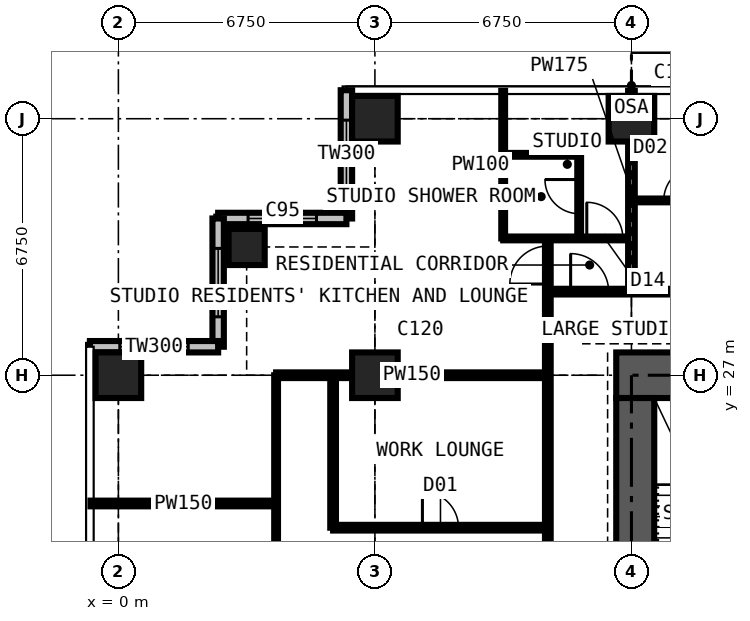
"""IFC4 building model, lengths in metres.
Left out: names, types, materials, properties, quantities, classifications, styles, units other than length and angle.
Written with IfcOpenShell. Run it as: python <this file> out.ifc"""

import sys

from ifc_helpers import new_model, si_unit, direction, frame, frame_2d, origin, origin_2d, place, context, subcontext, project, spatial, rectangle, extrude, element, fill, save


model = new_model("IFC4")
c1 = context("Model", 3, precision=1e-05, world=origin(), true_north=direction((0.0, 1.0)))
c2 = subcontext(c1, "Body", "Model", "MODEL_VIEW")
j1 = project(units=[si_unit("LENGTHUNIT", "METRE"), si_unit("PLANEANGLEUNIT", "RADIAN")], contexts=[c1])
p1 = place(None, origin())
s1 = spatial("IfcSite", under=j1, at=p1, CompositionType="ELEMENT")
p2 = place(p1, origin())
s2 = spatial("IfcBuilding", under=s1, at=p2, CompositionType="ELEMENT")
p3 = place(p2, frame((0.0, 0.0, 174.6)))
s3 = spatial("IfcBuildingStorey", under=s2, at=p3, CompositionType="ELEMENT", Elevation=174.6)
p4 = place(p3, frame((0.0, 27.0, 0.0), z_axis=(0.0, 0.0, 1.0), x_axis=(1.0, 0.0, 0.0)))
e1 = element("IfcColumn", 1, at=p4, inside=s3, PredefinedType="COLUMN", context=c2, shape_type="SweptSolid", body=[
    extrude(rectangle(XDim=1.2, YDim=1.2, at=origin_2d()), origin(), (0.0, 0.0, 1.0), 3.6),
])
p5 = place(p3, frame((3.375, 30.375, 0.0), z_axis=(0.0, 0.0, 1.0), x_axis=(1.0, 0.0, 0.0)))
e2 = element("IfcColumn", 2, at=p5, inside=s3, PredefinedType="COLUMN", context=c2, shape_type="SweptSolid", body=[
    extrude(rectangle(XDim=0.95, YDim=0.95, at=origin_2d()), origin(), (0.0, 0.0, 1.0), 3.6),
])
for number, where, z_axis, x_axis in (
    (3, (6.75, 27.0, 0.0), (0.0, 0.0, 1.0), (1.0, 0.0, 0.0)),
    (4, (6.75, 33.75, 0.0), (0.0, 0.0, 1.0), (1.0, 0.0, 0.0)),
    (5, (13.5, 33.75, 0.0), (0.0, 0.0, 1.0), (1.0, 0.0, 0.0)),
):
    element("IfcColumn", number, at=place(p3, frame(where, z_axis=z_axis, x_axis=x_axis)), inside=s3, PredefinedType="COLUMN", context=c2, shape_type="SweptSolid", body=[
        extrude(rectangle(XDim=1.2, YDim=1.2, at=origin_2d()), origin(), (0.0, 0.0, 1.0), 3.6),
    ])
p6 = place(p3, frame((27.4, 27.0, 0.0), z_axis=(0.0, 0.0, 1.0), x_axis=(-1.0, 0.0, 0.0)))
e6 = element("IfcWall", 6, at=p6, inside=s3, PredefinedType="SHEAR", context=c2, shape_type="SweptSolid", body=[
    extrude(rectangle(XDim=14.3, YDim=1.2, at=frame_2d((7.15, 0.0))), origin(), (0.0, 0.0, 1.0), 3.6),
])
p7 = place(p6, frame((5.225, 0.0, 0.0)))
e7 = element("IfcOpeningElement", 7, at=p7, cuts=e6, PredefinedType="OPENING", context=c2, shape_type="SweptSolid", body=[
    extrude(rectangle(XDim=0.9, YDim=2.2, at=frame_2d((0.45, 1.1))), frame((0.0, 0.61, 0.0), z_axis=(0.0, -1.0, 0.0), x_axis=(1.0, 0.0, 0.0)), (0.0, 0.0, 1.0), 1.22),
])
p8 = place(p6, frame((8.2, 0.0, 0.0)))
e8 = element("IfcOpeningElement", 8, at=p8, cuts=e6, PredefinedType="OPENING", context=c2, shape_type="SweptSolid", body=[
    extrude(rectangle(XDim=1.0, YDim=2.2, at=frame_2d((0.5, 1.1))), frame((0.0, 0.61, 0.0), z_axis=(0.0, -1.0, 0.0), x_axis=(1.0, 0.0, 0.0)), (0.0, 0.0, 1.0), 1.22),
])
p9 = place(p3, frame((13.6, 26.4, 0.0), z_axis=(0.0, 0.0, 1.0), x_axis=(0.0, -1.0, 0.0)))
e9 = element("IfcWall", 9, at=p9, inside=s3, PredefinedType="SHEAR", context=c2, shape_type="SweptSolid", body=[
    extrude(rectangle(XDim=12.3, YDim=1.0, at=frame_2d((6.15, 0.0))), origin(), (0.0, 0.0, 1.0), 3.6),
])
p10 = place(p9, frame((7.45, 0.0, 0.0)))
e10 = element("IfcOpeningElement", 10, at=p10, cuts=e9, PredefinedType="OPENING", context=c2, shape_type="SweptSolid", body=[
    extrude(rectangle(XDim=1.2, YDim=2.2, at=frame_2d((0.6, 1.1))), frame((0.0, 0.51, 0.0), z_axis=(0.0, -1.0, 0.0), x_axis=(1.0, 0.0, 0.0)), (0.0, 0.0, 1.0), 1.02),
])
p11 = place(p3, frame((6.0, 34.5, 0.0), z_axis=(0.0, 0.0, 1.0), x_axis=(0.0, -1.0, 0.0)))
e11 = element("IfcWall", 11, at=p11, inside=s3, PredefinedType="SOLIDWALL", context=c2, shape_type="SweptSolid", body=[
    extrude(rectangle(XDim=3.375, YDim=0.3, at=frame_2d((1.688, 0.0))), origin(), (0.0, 0.0, 1.0), 3.375),
])
p12 = place(p11, frame((0.788, 0.0, 0.6)))
e12 = element("IfcOpeningElement", 12, at=p12, cuts=e11, PredefinedType="OPENING", context=c2, shape_type="SweptSolid", body=[
    extrude(rectangle(XDim=1.8, YDim=2.1, at=frame_2d((0.9, 1.05))), frame((0.0, 0.16, 0.0), z_axis=(0.0, -1.0, 0.0), x_axis=(1.0, 0.0, 0.0)), (0.0, 0.0, 1.0), 0.32),
])
p13 = place(p3, frame((6.0, 31.125, 0.0), z_axis=(0.0, 0.0, 1.0), x_axis=(-1.0, 0.0, 0.0)))
e13 = element("IfcWall", 13, at=p13, inside=s3, PredefinedType="SOLIDWALL", context=c2, shape_type="SweptSolid", body=[
    extrude(rectangle(XDim=3.375, YDim=0.3, at=frame_2d((1.688, 0.0))), origin(), (0.0, 0.0, 1.0), 3.375),
])
p14 = place(p13, frame((0.788, 0.0, 0.6)))
e14 = element("IfcOpeningElement", 14, at=p14, cuts=e13, PredefinedType="OPENING", context=c2, shape_type="SweptSolid", body=[
    extrude(rectangle(XDim=1.8, YDim=2.1, at=frame_2d((0.9, 1.05))), frame((0.0, 0.16, 0.0), z_axis=(0.0, -1.0, 0.0), x_axis=(1.0, 0.0, 0.0)), (0.0, 0.0, 1.0), 0.32),
])
p15 = place(p3, frame((2.625, 31.125, 0.0), z_axis=(0.0, 0.0, 1.0), x_axis=(0.0, -1.0, 0.0)))
e15 = element("IfcWall", 15, at=p15, inside=s3, PredefinedType="SOLIDWALL", context=c2, shape_type="SweptSolid", body=[
    extrude(rectangle(XDim=3.375, YDim=0.3, at=frame_2d((1.688, 0.0))), origin(), (0.0, 0.0, 1.0), 3.375),
])
p16 = place(p15, frame((0.788, 0.0, 0.6)))
e16 = element("IfcOpeningElement", 16, at=p16, cuts=e15, PredefinedType="OPENING", context=c2, shape_type="SweptSolid", body=[
    extrude(rectangle(XDim=1.8, YDim=2.1, at=frame_2d((0.9, 1.05))), frame((0.0, 0.16, 0.0), z_axis=(0.0, -1.0, 0.0), x_axis=(1.0, 0.0, 0.0)), (0.0, 0.0, 1.0), 0.32),
])
p17 = place(p3, frame((2.625, 27.75, 0.0), z_axis=(0.0, 0.0, 1.0), x_axis=(-1.0, 0.0, 0.0)))
e17 = element("IfcWall", 17, at=p17, inside=s3, PredefinedType="SOLIDWALL", context=c2, shape_type="SweptSolid", body=[
    extrude(rectangle(XDim=3.375, YDim=0.3, at=frame_2d((1.688, 0.0))), origin(), (0.0, 0.0, 1.0), 3.375),
])
p18 = place(p17, frame((0.788, 0.0, 0.6)))
e18 = element("IfcOpeningElement", 18, at=p18, cuts=e17, PredefinedType="OPENING", context=c2, shape_type="SweptSolid", body=[
    extrude(rectangle(XDim=1.8, YDim=2.1, at=frame_2d((0.9, 1.05))), frame((0.0, 0.16, 0.0), z_axis=(0.0, -1.0, 0.0), x_axis=(1.0, 0.0, 0.0)), (0.0, 0.0, 1.0), 0.32),
])
p19 = place(p3, frame((-0.734, 23.625, 0.0), z_axis=(0.0, 0.0, 1.0), x_axis=(1.0, 0.0, 0.0)))
e19 = element("IfcWall", 19, at=p19, inside=s3, PredefinedType="PARTITIONING", context=c2, shape_type="SweptSolid", body=[
    extrude(rectangle(XDim=4.884, YDim=0.15, at=frame_2d((2.442, 0.0))), origin(), (0.0, 0.0, 1.0), 3.375),
])
p20 = place(p3, frame((4.15, 10.125, 0.0), z_axis=(0.0, 0.0, 1.0), x_axis=(0.0, 1.0, 0.0)))
e20 = element("IfcWall", 20, at=p20, inside=s3, PredefinedType="PARTITIONING", context=c2, shape_type="SweptSolid", body=[
    extrude(rectangle(XDim=16.875, YDim=0.1, at=frame_2d((8.438, 0.0))), origin(), (0.0, 0.0, 1.0), 3.375),
])
p21 = place(p20, frame((4.2, 0.0, 0.0)))
e21 = element("IfcOpeningElement", 21, at=p21, cuts=e20, PredefinedType="OPENING", context=c2, shape_type="SweptSolid", body=[
    extrude(rectangle(XDim=0.95, YDim=2.2, at=frame_2d((0.475, 1.1))), frame((0.0, 0.06, 0.0), z_axis=(0.0, -1.0, 0.0), x_axis=(1.0, 0.0, 0.0)), (0.0, 0.0, 1.0), 0.12),
])
p22 = place(p20, frame((10.95, 0.0, 0.0)))
e22 = element("IfcOpeningElement", 22, at=p22, cuts=e20, PredefinedType="OPENING", context=c2, shape_type="SweptSolid", body=[
    extrude(rectangle(XDim=0.95, YDim=2.2, at=frame_2d((0.475, 1.1))), frame((0.0, 0.06, 0.0), z_axis=(0.0, -1.0, 0.0), x_axis=(1.0, 0.0, 0.0)), (0.0, 0.0, 1.0), 0.12),
])
p23 = place(p3, frame((4.15, 27.0, 0.0), z_axis=(0.0, 0.0, 1.0), x_axis=(1.0, 0.0, 0.0)))
e23 = element("IfcWall", 23, at=p23, inside=s3, PredefinedType="PARTITIONING", context=c2, shape_type="SweptSolid", body=[
    extrude(rectangle(XDim=7.15, YDim=0.15, at=frame_2d((3.575, 0.0))), origin(), (0.0, 0.0, 1.0), 2.806),
])
p24 = place(p3, frame((5.65, 22.988, 0.0), z_axis=(0.0, 0.0, 1.0), x_axis=(0.0, 1.0, 0.0)))
e24 = element("IfcWall", 24, at=p24, inside=s3, PredefinedType="PARTITIONING", context=c2, shape_type="SweptSolid", body=[
    extrude(rectangle(XDim=4.012, YDim=0.15, at=frame_2d((2.006, 0.0))), origin(), (0.0, 0.0, 1.0), 3.375),
])
p25 = place(p3, frame((5.65, 22.988, 0.0), z_axis=(0.0, 0.0, 1.0), x_axis=(1.0, 0.0, 0.0)))
e25 = element("IfcWall", 25, at=p25, inside=s3, PredefinedType="PARTITIONING", context=c2, shape_type="SweptSolid", body=[
    extrude(rectangle(XDim=5.65, YDim=0.15, at=frame_2d((2.825, 0.0))), origin(), (0.0, 0.0, 1.0), 3.375),
])
p26 = place(p25, frame((2.35, 0.0, 0.0)))
e26 = element("IfcOpeningElement", 26, at=p26, cuts=e25, PredefinedType="OPENING", context=c2, shape_type="SweptSolid", body=[
    extrude(rectangle(XDim=0.95, YDim=2.2, at=frame_2d((0.475, 1.1))), frame((0.0, 0.085, 0.0), z_axis=(0.0, -1.0, 0.0), x_axis=(1.0, 0.0, 0.0)), (0.0, 0.0, 1.0), 0.17),
])
p27 = place(p3, frame((10.125, 30.6, 0.0), z_axis=(0.0, 0.0, 1.0), x_axis=(0.0, 1.0, 0.0)))
e27 = element("IfcWall", 27, at=p27, inside=s3, PredefinedType="PARTITIONING", context=c2, shape_type="SweptSolid", body=[
    extrude(rectangle(XDim=3.884, YDim=0.1, at=frame_2d((1.942, 0.0))), origin(), (0.0, 0.0, 1.0), 3.375),
])
p28 = place(p3, frame((10.125, 30.6, 0.0), z_axis=(0.0, 0.0, 1.0), x_axis=(1.0, 0.0, 0.0)))
e28 = element("IfcWall", 28, at=p28, inside=s3, PredefinedType="PARTITIONING", context=c2, shape_type="SweptSolid", body=[
    extrude(rectangle(XDim=3.375, YDim=0.1, at=frame_2d((1.688, 0.0))), origin(), (0.0, 0.0, 1.0), 3.375),
])
p29 = place(p28, frame((2.2, 0.0, 0.0)))
e29 = element("IfcOpeningElement", 29, at=p29, cuts=e28, PredefinedType="OPENING", context=c2, shape_type="SweptSolid", body=[
    extrude(rectangle(XDim=0.95, YDim=2.2, at=frame_2d((0.475, 1.1))), frame((0.0, 0.06, 0.0), z_axis=(0.0, -1.0, 0.0), x_axis=(1.0, 0.0, 0.0)), (0.0, 0.0, 1.0), 0.12),
])
p30 = place(p3, frame((10.125, 32.8, 0.0), z_axis=(0.0, 0.0, 1.0), x_axis=(1.0, 0.0, 0.0)))
e30 = element("IfcWall", 30, at=p30, inside=s3, PredefinedType="PARTITIONING", context=c2, shape_type="SweptSolid", body=[
    extrude(rectangle(XDim=2.0, YDim=0.1, at=frame_2d((1.0, 0.0))), origin(), (0.0, 0.0, 1.0), 3.375),
])
p31 = place(p3, frame((11.3, 11.3, 0.0), z_axis=(0.0, 0.0, 1.0), x_axis=(0.0, 1.0, 0.0)))
e31 = element("IfcWall", 31, at=p31, inside=s3, PredefinedType="PARTITIONING", context=c2, shape_type="SweptSolid", body=[
    extrude(rectangle(XDim=19.3, YDim=0.15, at=frame_2d((9.65, 0.0))), origin(), (0.0, 0.0, 1.0), 3.375),
])
p32 = place(p31, frame((18.1, 0.0, 0.0)))
e32 = element("IfcOpeningElement", 32, at=p32, cuts=e31, PredefinedType="OPENING", context=c2, shape_type="SweptSolid", body=[
    extrude(rectangle(XDim=1.0, YDim=2.2, at=frame_2d((0.5, 1.1))), frame((0.0, 0.085, 0.0), z_axis=(0.0, -1.0, 0.0), x_axis=(1.0, 0.0, 0.0)), (0.0, 0.0, 1.0), 0.17),
])
p33 = place(p31, frame((10.137, 0.0, 0.0)))
e33 = element("IfcOpeningElement", 33, at=p33, cuts=e31, PredefinedType="OPENING", context=c2, shape_type="SweptSolid", body=[
    extrude(rectangle(XDim=1.0, YDim=2.2, at=frame_2d((0.5, 1.1))), frame((0.0, 0.085, 0.0), z_axis=(0.0, -1.0, 0.0), x_axis=(1.0, 0.0, 0.0)), (0.0, 0.0, 1.0), 0.17),
])
p34 = place(p3, frame((11.3, 29.2, 0.0), z_axis=(0.0, 0.0, 1.0), x_axis=(1.0, 0.0, 0.0)))
e34 = element("IfcWall", 34, at=p34, inside=s3, PredefinedType="PARTITIONING", context=c2, shape_type="SweptSolid", body=[
    extrude(rectangle(XDim=19.809, YDim=0.15, at=frame_2d((9.904, 0.0))), origin(), (0.0, 0.0, 1.0), 3.375),
])
p35 = place(p34, frame((12.9, 0.0, 0.0)))
e35 = element("IfcOpeningElement", 35, at=p35, cuts=e34, PredefinedType="OPENING", context=c2, shape_type="SweptSolid", body=[
    extrude(rectangle(XDim=1.0, YDim=2.2, at=frame_2d((0.5, 1.1))), frame((0.0, 0.085, 0.0), z_axis=(0.0, -1.0, 0.0), x_axis=(1.0, 0.0, 0.0)), (0.0, 0.0, 1.0), 0.17),
])
p36 = place(p34, frame((6.4, 0.0, 0.0)))
e36 = element("IfcOpeningElement", 36, at=p36, cuts=e34, PredefinedType="OPENING", context=c2, shape_type="SweptSolid", body=[
    extrude(rectangle(XDim=0.95, YDim=2.2, at=frame_2d((0.475, 1.1))), frame((0.0, 0.085, 0.0), z_axis=(0.0, -1.0, 0.0), x_axis=(1.0, 0.0, 0.0)), (0.0, 0.0, 1.0), 0.17),
])
p37 = place(p34, frame((0.6, 0.0, 0.0)))
e37 = element("IfcOpeningElement", 37, at=p37, cuts=e34, PredefinedType="OPENING", context=c2, shape_type="SweptSolid", body=[
    extrude(rectangle(XDim=1.0, YDim=2.2, at=frame_2d((0.5, 1.1))), frame((0.0, 0.085, 0.0), z_axis=(0.0, -1.0, 0.0), x_axis=(1.0, 0.0, 0.0)), (0.0, 0.0, 1.0), 0.17),
])
p38 = place(p3, frame((12.125, 30.6, 0.0), z_axis=(0.0, 0.0, 1.0), x_axis=(0.0, 1.0, 0.0)))
e38 = element("IfcWall", 38, at=p38, inside=s3, PredefinedType="PARTITIONING", context=c2, shape_type="SweptSolid", body=[
    extrude(rectangle(XDim=2.2, YDim=0.1, at=frame_2d((1.1, 0.0))), origin(), (0.0, 0.0, 1.0), 3.375),
])
p39 = place(p38, frame((0.65, 0.0, 0.0)))
e39 = element("IfcOpeningElement", 39, at=p39, cuts=e38, PredefinedType="OPENING", context=c2, shape_type="SweptSolid", body=[
    extrude(rectangle(XDim=0.9, YDim=2.2, at=frame_2d((0.45, 1.1))), frame((0.0, 0.06, 0.0), z_axis=(0.0, -1.0, 0.0), x_axis=(1.0, 0.0, 0.0)), (0.0, 0.0, 1.0), 0.12),
])
p40 = place(p3, frame((13.5, 29.2, 0.0), z_axis=(0.0, 0.0, 1.0), x_axis=(0.0, 1.0, 0.0)))
e40 = element("IfcWall", 40, at=p40, inside=s3, PredefinedType="PARTITIONING", context=c2, shape_type="SweptSolid", body=[
    extrude(rectangle(XDim=5.284, YDim=0.175, at=frame_2d((2.642, 0.0))), origin(), (0.0, 0.0, 1.0), 2.61),
])
p41 = place(p3, frame((13.5, 31.6, 0.0), z_axis=(0.0, 0.0, 1.0), x_axis=(1.0, 0.0, 0.0)))
e41 = element("IfcWall", 41, at=p41, inside=s3, PredefinedType="PARTITIONING", context=c2, shape_type="SweptSolid", body=[
    extrude(rectangle(XDim=2.6, YDim=0.1, at=frame_2d((1.3, 0.0))), origin(), (0.0, 0.0, 1.0), 3.375),
])
p42 = place(p41, frame((0.85, 0.0, 0.0)))
e42 = element("IfcOpeningElement", 42, at=p42, cuts=e41, PredefinedType="OPENING", context=c2, shape_type="SweptSolid", body=[
    extrude(rectangle(XDim=0.9, YDim=2.2, at=frame_2d((0.45, 1.1))), frame((0.0, 0.06, 0.0), z_axis=(0.0, -1.0, 0.0), x_axis=(1.0, 0.0, 0.0)), (0.0, 0.0, 1.0), 0.12),
])
p43 = place(p12, origin())
e43 = element("IfcWindow", 43, at=p43, inside=s3, PartitioningType="SINGLE_PANEL", PredefinedType="WINDOW", context=c2, shape_type="SweptSolid", body=[
    extrude(rectangle(XDim=1.8, YDim=2.1, at=frame_2d((0.9, 1.05))), frame((0.0, 0.03, 0.0), z_axis=(0.0, -1.0, 0.0), x_axis=(1.0, 0.0, 0.0)), (0.0, 0.0, 1.0), 0.06),
])
fill(e12, e43)
p44 = place(p14, origin())
e44 = element("IfcWindow", 44, at=p44, inside=s3, PartitioningType="SINGLE_PANEL", PredefinedType="WINDOW", context=c2, shape_type="SweptSolid", body=[
    extrude(rectangle(XDim=1.8, YDim=2.1, at=frame_2d((0.9, 1.05))), frame((0.0, 0.03, 0.0), z_axis=(0.0, -1.0, 0.0), x_axis=(1.0, 0.0, 0.0)), (0.0, 0.0, 1.0), 0.06),
])
fill(e14, e44)
p45 = place(p16, origin())
e45 = element("IfcWindow", 45, at=p45, inside=s3, PartitioningType="SINGLE_PANEL", PredefinedType="WINDOW", context=c2, shape_type="SweptSolid", body=[
    extrude(rectangle(XDim=1.8, YDim=2.1, at=frame_2d((0.9, 1.05))), frame((0.0, 0.03, 0.0), z_axis=(0.0, -1.0, 0.0), x_axis=(1.0, 0.0, 0.0)), (0.0, 0.0, 1.0), 0.06),
])
fill(e16, e45)
p46 = place(p18, origin())
e46 = element("IfcWindow", 46, at=p46, inside=s3, PartitioningType="SINGLE_PANEL", PredefinedType="WINDOW", context=c2, shape_type="SweptSolid", body=[
    extrude(rectangle(XDim=1.8, YDim=2.1, at=frame_2d((0.9, 1.05))), frame((0.0, 0.03, 0.0), z_axis=(0.0, -1.0, 0.0), x_axis=(1.0, 0.0, 0.0)), (0.0, 0.0, 1.0), 0.06),
])
fill(e18, e46)
p47 = place(p42, origin())
e47 = element("IfcDoor", 47, at=p47, inside=s3, OperationType="SINGLE_SWING_RIGHT", PredefinedType="DOOR", context=c2, shape_type="SweptSolid", body=[
    extrude(rectangle(XDim=0.9, YDim=2.2, at=frame_2d((0.45, 1.1))), frame((0.0, 0.025, 0.0), z_axis=(0.0, -1.0, 0.0), x_axis=(1.0, 0.0, 0.0)), (0.0, 0.0, 1.0), 0.05),
])
fill(e42, e47)
p48 = place(p29, origin())
e48 = element("IfcDoor", 48, at=p48, inside=s3, OperationType="SINGLE_SWING_LEFT", PredefinedType="DOOR", context=c2, shape_type="SweptSolid", body=[
    extrude(rectangle(XDim=0.95, YDim=2.2, at=frame_2d((0.475, 1.1))), frame((0.0, 0.025, 0.0), z_axis=(0.0, -1.0, 0.0), x_axis=(1.0, 0.0, 0.0)), (0.0, 0.0, 1.0), 0.05),
])
fill(e29, e48)
p49 = place(p39, origin())
e49 = element("IfcDoor", 49, at=p49, inside=s3, OperationType="SINGLE_SWING_RIGHT", PredefinedType="DOOR", context=c2, shape_type="SweptSolid", body=[
    extrude(rectangle(XDim=0.9, YDim=2.2, at=frame_2d((0.45, 1.1))), frame((0.0, 0.025, 0.0), z_axis=(0.0, -1.0, 0.0), x_axis=(1.0, 0.0, 0.0)), (0.0, 0.0, 1.0), 0.05),
])
fill(e39, e49)
p50 = place(p37, origin())
e50 = element("IfcDoor", 50, at=p50, inside=s3, OperationType="SINGLE_SWING_LEFT", PredefinedType="DOOR", context=c2, shape_type="SweptSolid", body=[
    extrude(rectangle(XDim=1.0, YDim=2.2, at=frame_2d((0.5, 1.1))), frame((0.0, 0.025, 0.0), z_axis=(0.0, -1.0, 0.0), x_axis=(1.0, 0.0, 0.0)), (0.0, 0.0, 1.0), 0.05),
])
fill(e37, e50)
p51 = place(p32, origin())
e51 = element("IfcDoor", 51, at=p51, inside=s3, OperationType="SINGLE_SWING_LEFT", PredefinedType="DOOR", context=c2, shape_type="SweptSolid", body=[
    extrude(rectangle(XDim=1.0, YDim=2.2, at=frame_2d((0.5, 1.1))), frame((0.0, 0.025, 0.0), z_axis=(0.0, -1.0, 0.0), x_axis=(1.0, 0.0, 0.0)), (0.0, 0.0, 1.0), 0.05),
])
fill(e32, e51)
p52 = place(p26, origin())
e52 = element("IfcDoor", 52, at=p52, inside=s3, OperationType="SINGLE_SWING_LEFT", PredefinedType="DOOR", context=c2, shape_type="SweptSolid", body=[
    extrude(rectangle(XDim=0.95, YDim=2.2, at=frame_2d((0.475, 1.1))), frame((0.0, 0.025, 0.0), z_axis=(0.0, -1.0, 0.0), x_axis=(1.0, 0.0, 0.0)), (0.0, 0.0, 1.0), 0.05),
])
fill(e26, e52)
save(model, sys.argv[1])
